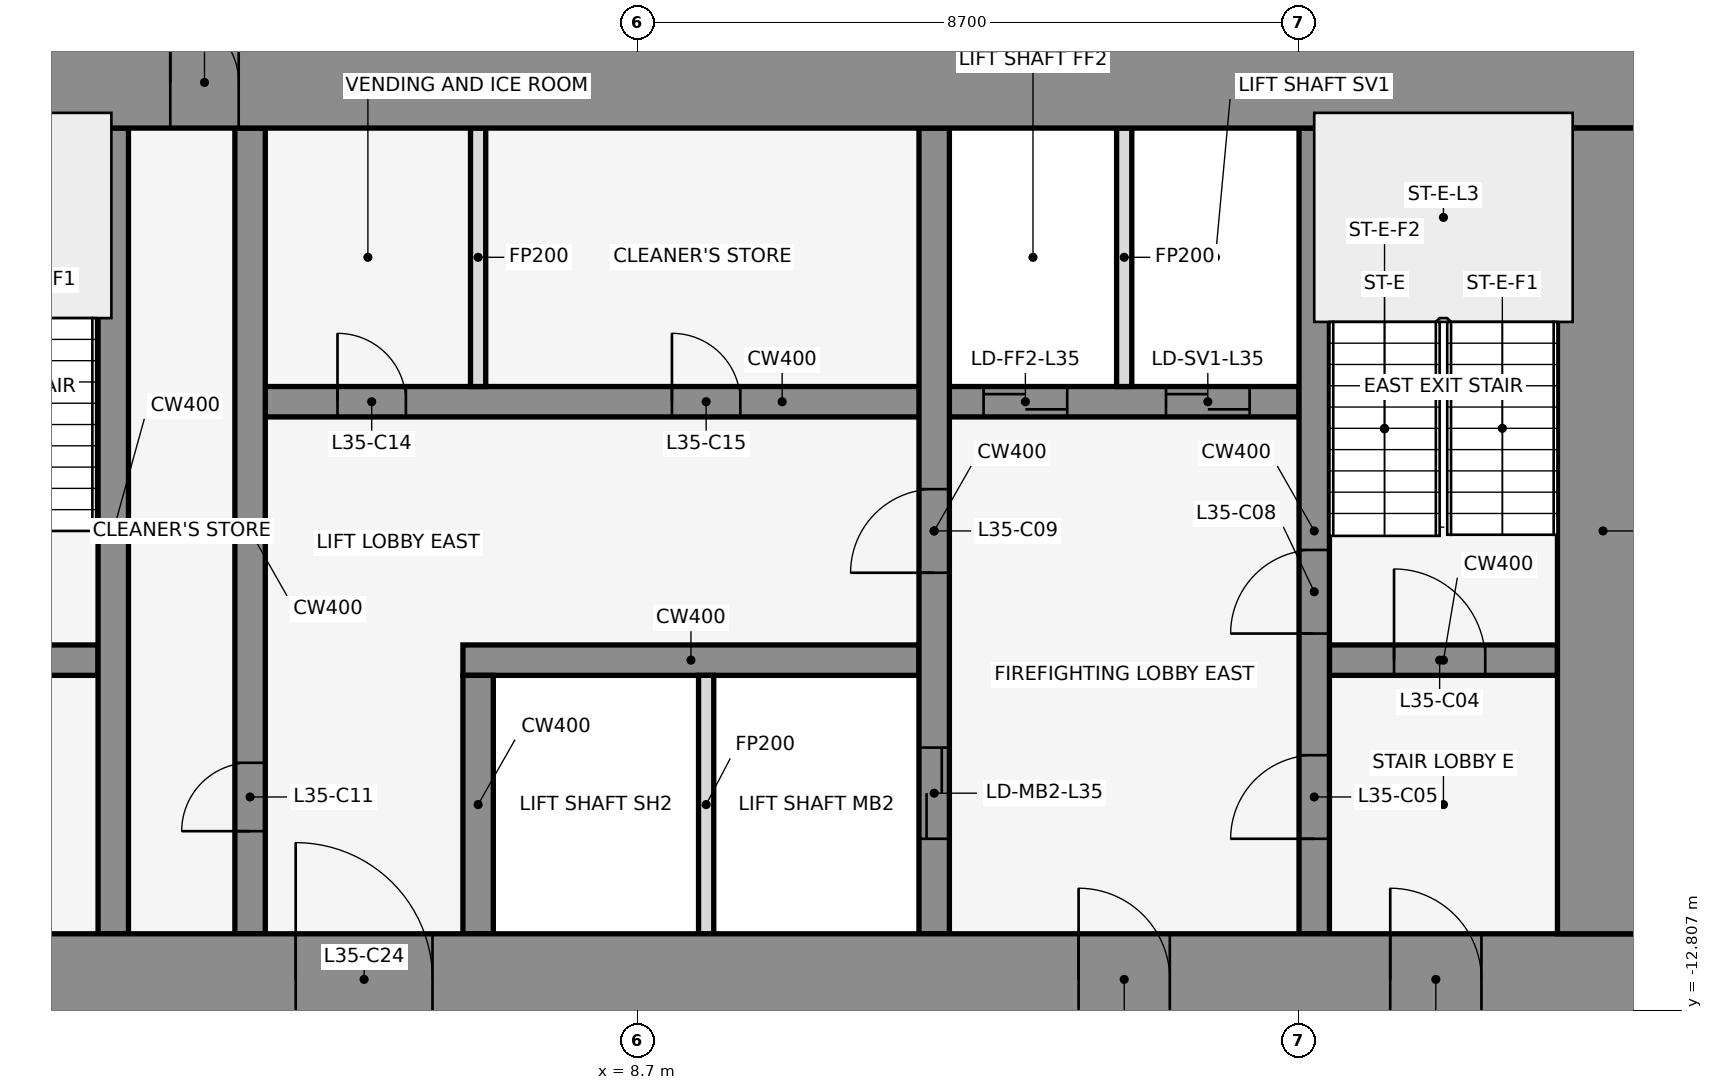
"""IFC4 building model, lengths in metres.
Left out: names, types, materials, properties, quantities, classifications, styles, units other than length and angle.
Written with IfcOpenShell. Run it as: python <this file> out.ifc"""

import sys

from ifc_helpers import new_model, si_unit, direction, frame, frame_2d, origin, place, context, subcontext, project, spatial, rectangle, extrude, element, fill, save


model = new_model("IFC4")
c1 = context("Model", 3, precision=1e-05, world=origin(), true_north=direction((0.0, 1.0)))
c2 = subcontext(c1, "Body", "Model", "MODEL_VIEW")
j1 = project(units=[si_unit("LENGTHUNIT", "METRE"), si_unit("PLANEANGLEUNIT", "RADIAN")], contexts=[c1])
p1 = place(None, origin())
s1 = spatial("IfcSite", under=j1, at=p1, CompositionType="ELEMENT")
p2 = place(p1, origin())
s2 = spatial("IfcBuilding", under=s1, at=p2, CompositionType="ELEMENT")
p3 = place(p2, frame((0.0, 0.0, 160.9)))
s3 = spatial("IfcBuildingStorey", under=s2, at=p3, CompositionType="ELEMENT", Elevation=160.9)
for number, where, z_axis, x_axis in (
    (1, (16.432, -0.105, 0.0), (0.0, 0.0, 1.0), (-0.84, 0.543, 0.0)),
    (2, (1.901, 1.08, 0.0), (0.0, 0.0, 1.0), (-0.84, -0.543, 0.0)),
):
    element("IfcWall", number, at=place(p3, frame(where, z_axis=z_axis, x_axis=x_axis)), inside=s3, PredefinedType="STANDARD", context=c2, shape_type="SweptSolid", body=[
        extrude(rectangle(XDim=2.183, YDim=0.25, at=frame_2d((1.091, 0.0))), origin(), (0.0, 0.0, 1.0), 3.95),
    ])
p4 = place(p3, frame((-1.6, -8.2, 0.0), z_axis=(0.0, 0.0, 1.0), x_axis=(1.0, 0.0, 0.0)))
e3 = element("IfcWall", 3, at=p4, inside=s3, PredefinedType="SHEAR", context=c2, shape_type="SweptSolid", body=[
    extrude(rectangle(XDim=3.2, YDim=0.4, at=frame_2d((1.6, 0.0))), origin(), (0.0, 0.0, 1.0), 4.1),
])
p5 = place(p4, frame((1.05, 0.0, 0.0)))
e4 = element("IfcOpeningElement", 4, at=p5, cuts=e3, PredefinedType="OPENING", context=c2, shape_type="SweptSolid", body=[
    extrude(rectangle(XDim=1.2, YDim=2.1, at=frame_2d((0.6, 1.05))), frame((0.0, 0.212, 0.0), z_axis=(0.0, -1.0, 0.0), x_axis=(1.0, 0.0, 0.0)), (0.0, 0.0, 1.0), 0.424),
])
p6 = place(p3, frame((6.4, -8.2, 0.0), z_axis=(0.0, 0.0, 1.0), x_axis=(1.0, 0.0, 0.0)))
e5 = element("IfcWall", 5, at=p6, inside=s3, PredefinedType="SHEAR", context=c2, shape_type="SweptSolid", body=[
    extrude(rectangle(XDim=6.0, YDim=0.4, at=frame_2d((3.0, 0.0))), origin(), (0.0, 0.0, 1.0), 4.1),
])
p7 = place(p3, frame((17.8, -8.2, 0.0), z_axis=(0.0, 0.0, 1.0), x_axis=(1.0, 0.0, 0.0)))
e6 = element("IfcWall", 6, at=p7, inside=s3, PredefinedType="SHEAR", context=c2, shape_type="SweptSolid", body=[
    extrude(rectangle(XDim=3.0, YDim=0.4, at=frame_2d((1.5, 0.0))), origin(), (0.0, 0.0, 1.0), 4.1),
])
p8 = place(p7, frame((0.85, 0.0, 0.0)))
e7 = element("IfcOpeningElement", 7, at=p8, cuts=e6, PredefinedType="OPENING", context=c2, shape_type="SweptSolid", body=[
    extrude(rectangle(XDim=1.2, YDim=2.1, at=frame_2d((0.6, 1.05))), frame((0.0, 0.212, 0.0), z_axis=(0.0, -1.0, 0.0), x_axis=(1.0, 0.0, 0.0)), (0.0, 0.0, 1.0), 0.424),
])
p9 = place(p3, frame((3.8, -4.8, 0.0), z_axis=(0.0, 0.0, 1.0), x_axis=(1.0, 0.0, 0.0)))
e8 = element("IfcWall", 8, at=p9, inside=s3, PredefinedType="SHEAR", context=c2, shape_type="SweptSolid", body=[
    extrude(rectangle(XDim=13.6, YDim=0.4, at=frame_2d((6.8, 0.0))), origin(), (0.0, 0.0, 1.0), 4.1),
])
p10 = place(p9, frame((9.45, 0.0, 0.0)))
e9 = element("IfcOpeningElement", 9, at=p10, cuts=e8, PredefinedType="OPENING", context=c2, shape_type="SweptSolid", body=[
    extrude(rectangle(XDim=1.1, YDim=2.1, at=frame_2d((0.55, 1.05))), frame((0.0, 0.212, 0.0), z_axis=(0.0, -1.0, 0.0), x_axis=(1.0, 0.0, 0.0)), (0.0, 0.0, 1.0), 0.424),
])
p11 = place(p9, frame((11.85, 0.0, 0.0)))
e10 = element("IfcOpeningElement", 10, at=p11, cuts=e8, PredefinedType="OPENING", context=c2, shape_type="SweptSolid", body=[
    extrude(rectangle(XDim=1.1, YDim=2.1, at=frame_2d((0.55, 1.05))), frame((0.0, 0.212, 0.0), z_axis=(0.0, -1.0, 0.0), x_axis=(1.0, 0.0, 0.0)), (0.0, 0.0, 1.0), 0.424),
])
p12 = place(p9, frame((0.95, 0.0, 0.0)))
e11 = element("IfcOpeningElement", 11, at=p12, cuts=e8, PredefinedType="OPENING", context=c2, shape_type="SweptSolid", body=[
    extrude(rectangle(XDim=0.9, YDim=2.1, at=frame_2d((0.45, 1.05))), frame((0.0, 0.212, 0.0), z_axis=(0.0, -1.0, 0.0), x_axis=(1.0, 0.0, 0.0)), (0.0, 0.0, 1.0), 0.424),
])
p13 = place(p9, frame((5.35, 0.0, 0.0)))
e12 = element("IfcOpeningElement", 12, at=p13, cuts=e8, PredefinedType="OPENING", context=c2, shape_type="SweptSolid", body=[
    extrude(rectangle(XDim=0.9, YDim=2.1, at=frame_2d((0.45, 1.05))), frame((0.0, 0.212, 0.0), z_axis=(0.0, -1.0, 0.0), x_axis=(1.0, 0.0, 0.0)), (0.0, 0.0, 1.0), 0.424),
])
p14 = place(p3, frame((1.8, -11.8, 0.0), z_axis=(0.0, 0.0, 1.0), x_axis=(0.0, 1.0, 0.0)))
e13 = element("IfcWall", 13, at=p14, inside=s3, PredefinedType="SHEAR", context=c2, shape_type="SweptSolid", body=[
    extrude(rectangle(XDim=10.6, YDim=0.4, at=frame_2d((5.3, 0.0))), origin(), (0.0, 0.0, 1.0), 4.1),
])
p15 = place(p3, frame((3.6, -11.8, 0.0), z_axis=(0.0, 0.0, 1.0), x_axis=(0.0, 1.0, 0.0)))
e14 = element("IfcWall", 14, at=p15, inside=s3, PredefinedType="SHEAR", context=c2, shape_type="SweptSolid", body=[
    extrude(rectangle(XDim=10.6, YDim=0.4, at=frame_2d((5.3, 0.0))), origin(), (0.0, 0.0, 1.0), 4.1),
])
p16 = place(p15, frame((1.35, 0.0, 0.0)))
e15 = element("IfcOpeningElement", 15, at=p16, cuts=e14, PredefinedType="OPENING", context=c2, shape_type="SweptSolid", body=[
    extrude(rectangle(XDim=0.9, YDim=2.1, at=frame_2d((0.45, 1.05))), frame((0.0, 0.212, 0.0), z_axis=(0.0, -1.0, 0.0), x_axis=(1.0, 0.0, 0.0)), (0.0, 0.0, 1.0), 0.424),
])
p17 = place(p3, frame((6.6, -11.8, 0.0), z_axis=(0.0, 0.0, 1.0), x_axis=(0.0, 1.0, 0.0)))
e16 = element("IfcWall", 16, at=p17, inside=s3, PredefinedType="SHEAR", context=c2, shape_type="SweptSolid", body=[
    extrude(rectangle(XDim=3.4, YDim=0.4, at=frame_2d((1.7, 0.0))), origin(), (0.0, 0.0, 1.0), 4.1),
])
for number, where, z_axis, x_axis in (
    (17, (6.6, -4.6, 0.0), (0.0, 0.0, 1.0), (0.0, 1.0, 0.0)),
    (18, (9.6, -11.8, 0.0), (0.0, 0.0, 1.0), (0.0, 1.0, 0.0)),
):
    element("IfcWall", number, at=place(p3, frame(where, z_axis=z_axis, x_axis=x_axis)), inside=s3, PredefinedType="PARTITIONING", context=c2, shape_type="SweptSolid", body=[
        extrude(rectangle(XDim=3.4, YDim=0.2, at=frame_2d((1.7, 0.0))), origin(), (0.0, 0.0, 1.0), 2.841),
    ])
p18 = place(p3, frame((12.6, -11.8, 0.0), z_axis=(0.0, 0.0, 1.0), x_axis=(0.0, 1.0, 0.0)))
e19 = element("IfcWall", 19, at=p18, inside=s3, PredefinedType="SHEAR", context=c2, shape_type="SweptSolid", body=[
    extrude(rectangle(XDim=10.6, YDim=0.4, at=frame_2d((5.3, 0.0))), origin(), (0.0, 0.0, 1.0), 4.1),
])
p19 = place(p18, frame((1.25, 0.0, 0.0)))
e20 = element("IfcOpeningElement", 20, at=p19, cuts=e19, PredefinedType="OPENING", context=c2, shape_type="SweptSolid", body=[
    extrude(rectangle(XDim=1.2, YDim=2.1, at=frame_2d((0.6, 1.05))), frame((0.0, 0.212, 0.0), z_axis=(0.0, -1.0, 0.0), x_axis=(1.0, 0.0, 0.0)), (0.0, 0.0, 1.0), 0.424),
])
p20 = place(p18, frame((4.75, 0.0, 0.0)))
e21 = element("IfcOpeningElement", 21, at=p20, cuts=e19, PredefinedType="OPENING", context=c2, shape_type="SweptSolid", body=[
    extrude(rectangle(XDim=1.1, YDim=2.1, at=frame_2d((0.55, 1.05))), frame((0.0, 0.212, 0.0), z_axis=(0.0, -1.0, 0.0), x_axis=(1.0, 0.0, 0.0)), (0.0, 0.0, 1.0), 0.424),
])
p21 = place(p3, frame((15.1, -4.6, 0.0), z_axis=(0.0, 0.0, 1.0), x_axis=(0.0, 1.0, 0.0)))
e22 = element("IfcWall", 22, at=p21, inside=s3, PredefinedType="PARTITIONING", context=c2, shape_type="SweptSolid", body=[
    extrude(rectangle(XDim=3.4, YDim=0.2, at=frame_2d((1.7, 0.0))), origin(), (0.0, 0.0, 1.0), 2.841),
])
p22 = place(p3, frame((17.6, -11.8, 0.0), z_axis=(0.0, 0.0, 1.0), x_axis=(0.0, 1.0, 0.0)))
e23 = element("IfcWall", 23, at=p22, inside=s3, PredefinedType="SHEAR", context=c2, shape_type="SweptSolid", body=[
    extrude(rectangle(XDim=10.6, YDim=0.4, at=frame_2d((5.3, 0.0))), origin(), (0.0, 0.0, 1.0), 4.1),
])
p23 = place(p22, frame((1.25, 0.0, 0.0)))
e24 = element("IfcOpeningElement", 24, at=p23, cuts=e23, PredefinedType="OPENING", context=c2, shape_type="SweptSolid", body=[
    extrude(rectangle(XDim=1.1, YDim=2.1, at=frame_2d((0.55, 1.05))), frame((0.0, 0.212, 0.0), z_axis=(0.0, -1.0, 0.0), x_axis=(1.0, 0.0, 0.0)), (0.0, 0.0, 1.0), 0.424),
])
p24 = place(p22, frame((3.95, 0.0, 0.0)))
e25 = element("IfcOpeningElement", 25, at=p24, cuts=e23, PredefinedType="OPENING", context=c2, shape_type="SweptSolid", body=[
    extrude(rectangle(XDim=1.1, YDim=2.1, at=frame_2d((0.55, 1.05))), frame((0.0, 0.212, 0.0), z_axis=(0.0, -1.0, 0.0), x_axis=(1.0, 0.0, 0.0)), (0.0, 0.0, 1.0), 0.424),
])
p25 = place(p3, frame((-22.0, -0.6, 0.0), z_axis=(0.0, 0.0, 1.0), x_axis=(1.0, 0.0, 0.0)))
e26 = element("IfcWall", 26, at=p25, inside=s3, PredefinedType="SHEAR", context=c2, shape_type="SweptSolid", body=[
    extrude(rectangle(XDim=44.0, YDim=1.2, at=frame_2d((22.0, 0.0))), origin(), (0.0, 0.0, 1.0), 4.1),
])
p26 = place(p25, frame((18.55, 0.0, 0.0)))
e27 = element("IfcOpeningElement", 27, at=p26, cuts=e26, PredefinedType="OPENING", context=c2, shape_type="SweptSolid", body=[
    extrude(rectangle(XDim=0.9, YDim=2.1, at=frame_2d((0.45, 1.05))), frame((0.0, 0.612, 0.0), z_axis=(0.0, -1.0, 0.0), x_axis=(1.0, 0.0, 0.0)), (0.0, 0.0, 1.0), 1.224),
])
p27 = place(p25, frame((24.55, 0.0, 0.0)))
e28 = element("IfcOpeningElement", 28, at=p27, cuts=e26, PredefinedType="OPENING", context=c2, shape_type="SweptSolid", body=[
    extrude(rectangle(XDim=0.9, YDim=2.1, at=frame_2d((0.45, 1.05))), frame((0.0, 0.612, 0.0), z_axis=(0.0, -1.0, 0.0), x_axis=(1.0, 0.0, 0.0)), (0.0, 0.0, 1.0), 1.224),
])
p28 = place(p3, frame((-22.0, -12.4, 0.0), z_axis=(0.0, 0.0, 1.0), x_axis=(1.0, 0.0, 0.0)))
e29 = element("IfcWall", 29, at=p28, inside=s3, PredefinedType="SHEAR", context=c2, shape_type="SweptSolid", body=[
    extrude(rectangle(XDim=44.0, YDim=1.2, at=frame_2d((22.0, 0.0))), origin(), (0.0, 0.0, 1.0), 4.1),
])
p29 = place(p28, frame((2.2, 0.0, 0.0)))
e30 = element("IfcOpeningElement", 30, at=p29, cuts=e29, PredefinedType="OPENING", context=c2, shape_type="SweptSolid", body=[
    extrude(rectangle(XDim=1.2, YDim=2.1, at=frame_2d((0.6, 1.05))), frame((0.0, 0.612, 0.0), z_axis=(0.0, -1.0, 0.0), x_axis=(1.0, 0.0, 0.0)), (0.0, 0.0, 1.0), 1.224),
])
p30 = place(p28, frame((21.4, 0.0, 0.0)))
e31 = element("IfcOpeningElement", 31, at=p30, cuts=e29, PredefinedType="OPENING", context=c2, shape_type="SweptSolid", body=[
    extrude(rectangle(XDim=1.2, YDim=2.1, at=frame_2d((0.6, 1.05))), frame((0.0, 0.612, 0.0), z_axis=(0.0, -1.0, 0.0), x_axis=(1.0, 0.0, 0.0)), (0.0, 0.0, 1.0), 1.224),
])
p31 = place(p28, frame((40.6, 0.0, 0.0)))
e32 = element("IfcOpeningElement", 32, at=p31, cuts=e29, PredefinedType="OPENING", context=c2, shape_type="SweptSolid", body=[
    extrude(rectangle(XDim=1.2, YDim=2.1, at=frame_2d((0.6, 1.05))), frame((0.0, 0.612, 0.0), z_axis=(0.0, -1.0, 0.0), x_axis=(1.0, 0.0, 0.0)), (0.0, 0.0, 1.0), 1.224),
])
p32 = place(p28, frame((16.0, 0.0, 0.0)))
e33 = element("IfcOpeningElement", 33, at=p32, cuts=e29, PredefinedType="OPENING", context=c2, shape_type="SweptSolid", body=[
    extrude(rectangle(XDim=1.8, YDim=2.1, at=frame_2d((0.9, 1.05))), frame((0.0, 0.612, 0.0), z_axis=(0.0, -1.0, 0.0), x_axis=(1.0, 0.0, 0.0)), (0.0, 0.0, 1.0), 1.224),
])
p33 = place(p28, frame((6.3, 0.0, 0.0)))
e34 = element("IfcOpeningElement", 34, at=p33, cuts=e29, PredefinedType="OPENING", context=c2, shape_type="SweptSolid", body=[
    extrude(rectangle(XDim=1.2, YDim=2.1, at=frame_2d((0.6, 1.05))), frame((0.0, 0.612, 0.0), z_axis=(0.0, -1.0, 0.0), x_axis=(1.0, 0.0, 0.0)), (0.0, 0.0, 1.0), 1.224),
])
p34 = place(p28, frame((26.2, 0.0, 0.0)))
e35 = element("IfcOpeningElement", 35, at=p34, cuts=e29, PredefinedType="OPENING", context=c2, shape_type="SweptSolid", body=[
    extrude(rectangle(XDim=1.8, YDim=2.1, at=frame_2d((0.9, 1.05))), frame((0.0, 0.612, 0.0), z_axis=(0.0, -1.0, 0.0), x_axis=(1.0, 0.0, 0.0)), (0.0, 0.0, 1.0), 1.224),
])
p35 = place(p28, frame((36.5, 0.0, 0.0)))
e36 = element("IfcOpeningElement", 36, at=p35, cuts=e29, PredefinedType="OPENING", context=c2, shape_type="SweptSolid", body=[
    extrude(rectangle(XDim=1.2, YDim=2.1, at=frame_2d((0.6, 1.05))), frame((0.0, 0.612, 0.0), z_axis=(0.0, -1.0, 0.0), x_axis=(1.0, 0.0, 0.0)), (0.0, 0.0, 1.0), 1.224),
])
p36 = place(p3, frame((21.4, -11.8, 0.0), z_axis=(0.0, 0.0, 1.0), x_axis=(0.0, 1.0, 0.0)))
e37 = element("IfcWall", 37, at=p36, inside=s3, PredefinedType="SHEAR", context=c2, shape_type="SweptSolid", body=[
    extrude(rectangle(XDim=10.6, YDim=1.2, at=frame_2d((5.3, 0.0))), origin(), (0.0, 0.0, 1.0), 4.1),
])
p37 = place(p8, origin())
e38 = element("IfcDoor", 38, at=p37, inside=s3, OperationType="SINGLE_SWING_RIGHT", PredefinedType="DOOR", context=c2, shape_type="SweptSolid", body=[
    extrude(rectangle(XDim=1.2, YDim=2.1, at=frame_2d((0.6, 1.05))), frame((0.0, 0.025, 0.0), z_axis=(0.0, -1.0, 0.0), x_axis=(1.0, 0.0, 0.0)), (0.0, 0.0, 1.0), 0.05),
])
fill(e7, e38)
p38 = place(p23, origin())
e39 = element("IfcDoor", 39, at=p38, inside=s3, OperationType="SINGLE_SWING_LEFT", PredefinedType="DOOR", context=c2, shape_type="SweptSolid", body=[
    extrude(rectangle(XDim=1.1, YDim=2.1, at=frame_2d((0.55, 1.05))), frame((0.0, 0.025, 0.0), z_axis=(0.0, -1.0, 0.0), x_axis=(1.0, 0.0, 0.0)), (0.0, 0.0, 1.0), 0.05),
])
fill(e24, e39)
p39 = place(p19, origin())
e40 = element("IfcDoor", 40, at=p39, inside=s3, OperationType="DOUBLE_DOOR_SLIDING", PredefinedType="DOOR", context=c2, shape_type="SweptSolid", body=[
    extrude(rectangle(XDim=1.2, YDim=2.1, at=frame_2d((0.6, 1.05))), frame((0.0, 0.025, 0.0), z_axis=(0.0, -1.0, 0.0), x_axis=(1.0, 0.0, 0.0)), (0.0, 0.0, 1.0), 0.05),
])
fill(e20, e40)
p40 = place(p10, origin())
e41 = element("IfcDoor", 41, at=p40, inside=s3, OperationType="DOUBLE_DOOR_SLIDING", PredefinedType="DOOR", context=c2, shape_type="SweptSolid", body=[
    extrude(rectangle(XDim=1.1, YDim=2.1, at=frame_2d((0.55, 1.05))), frame((0.0, 0.025, 0.0), z_axis=(0.0, -1.0, 0.0), x_axis=(1.0, 0.0, 0.0)), (0.0, 0.0, 1.0), 0.05),
])
fill(e9, e41)
p41 = place(p11, origin())
e42 = element("IfcDoor", 42, at=p41, inside=s3, OperationType="DOUBLE_DOOR_SLIDING", PredefinedType="DOOR", context=c2, shape_type="SweptSolid", body=[
    extrude(rectangle(XDim=1.1, YDim=2.1, at=frame_2d((0.55, 1.05))), frame((0.0, 0.025, 0.0), z_axis=(0.0, -1.0, 0.0), x_axis=(1.0, 0.0, 0.0)), (0.0, 0.0, 1.0), 0.05),
])
fill(e10, e42)
p42 = place(p24, origin())
e43 = element("IfcDoor", 43, at=p42, inside=s3, OperationType="SINGLE_SWING_RIGHT", PredefinedType="DOOR", context=c2, shape_type="SweptSolid", body=[
    extrude(rectangle(XDim=1.1, YDim=2.1, at=frame_2d((0.55, 1.05))), frame((0.0, 0.025, 0.0), z_axis=(0.0, -1.0, 0.0), x_axis=(1.0, 0.0, 0.0)), (0.0, 0.0, 1.0), 0.05),
])
fill(e25, e43)
p43 = place(p20, frame((1.1, 0.0, 0.0), z_axis=(0.0, 0.0, 1.0), x_axis=(-1.0, 0.0, 0.0)))
e44 = element("IfcDoor", 44, at=p43, inside=s3, OperationType="SINGLE_SWING_RIGHT", PredefinedType="DOOR", context=c2, shape_type="SweptSolid", body=[
    extrude(rectangle(XDim=1.1, YDim=2.1, at=frame_2d((0.55, 1.05))), frame((0.0, 0.025, 0.0), z_axis=(0.0, -1.0, 0.0), x_axis=(1.0, 0.0, 0.0)), (0.0, 0.0, 1.0), 0.05),
])
fill(e21, e44)
p44 = place(p16, origin())
e45 = element("IfcDoor", 45, at=p44, inside=s3, OperationType="SINGLE_SWING_LEFT", PredefinedType="DOOR", context=c2, shape_type="SweptSolid", body=[
    extrude(rectangle(XDim=0.9, YDim=2.1, at=frame_2d((0.45, 1.05))), frame((0.0, 0.025, 0.0), z_axis=(0.0, -1.0, 0.0), x_axis=(1.0, 0.0, 0.0)), (0.0, 0.0, 1.0), 0.05),
])
fill(e15, e45)
p45 = place(p12, origin())
e46 = element("IfcDoor", 46, at=p45, inside=s3, OperationType="SINGLE_SWING_RIGHT", PredefinedType="DOOR", context=c2, shape_type="SweptSolid", body=[
    extrude(rectangle(XDim=0.9, YDim=2.1, at=frame_2d((0.45, 1.05))), frame((0.0, 0.025, 0.0), z_axis=(0.0, -1.0, 0.0), x_axis=(1.0, 0.0, 0.0)), (0.0, 0.0, 1.0), 0.05),
])
fill(e11, e46)
p46 = place(p13, origin())
e47 = element("IfcDoor", 47, at=p46, inside=s3, OperationType="SINGLE_SWING_LEFT", PredefinedType="DOOR", context=c2, shape_type="SweptSolid", body=[
    extrude(rectangle(XDim=0.9, YDim=2.1, at=frame_2d((0.45, 1.05))), frame((0.0, 0.025, 0.0), z_axis=(0.0, -1.0, 0.0), x_axis=(1.0, 0.0, 0.0)), (0.0, 0.0, 1.0), 0.05),
])
fill(e12, e47)
p47 = place(p27, origin())
e48 = element("IfcDoor", 48, at=p47, inside=s3, OperationType="SINGLE_SWING_LEFT", PredefinedType="DOOR", context=c2, shape_type="SweptSolid", body=[
    extrude(rectangle(XDim=0.9, YDim=2.1, at=frame_2d((0.45, 1.05))), frame((0.0, 0.025, 0.0), z_axis=(0.0, -1.0, 0.0), x_axis=(1.0, 0.0, 0.0)), (0.0, 0.0, 1.0), 0.05),
])
fill(e28, e48)
p48 = place(p31, frame((1.2, 0.0, 0.0), z_axis=(0.0, 0.0, 1.0), x_axis=(-1.0, 0.0, 0.0)))
e49 = element("IfcDoor", 49, at=p48, inside=s3, OperationType="SINGLE_SWING_RIGHT", PredefinedType="DOOR", context=c2, shape_type="SweptSolid", body=[
    extrude(rectangle(XDim=1.2, YDim=2.1, at=frame_2d((0.6, 1.05))), frame((0.0, 0.025, 0.0), z_axis=(0.0, -1.0, 0.0), x_axis=(1.0, 0.0, 0.0)), (0.0, 0.0, 1.0), 0.05),
])
fill(e32, e49)
p49 = place(p34, origin())
e50 = element("IfcDoor", 50, at=p49, inside=s3, OperationType="SINGLE_SWING_LEFT", PredefinedType="DOOR", context=c2, shape_type="SweptSolid", body=[
    extrude(rectangle(XDim=1.8, YDim=2.1, at=frame_2d((0.9, 1.05))), frame((0.0, 0.025, 0.0), z_axis=(0.0, -1.0, 0.0), x_axis=(1.0, 0.0, 0.0)), (0.0, 0.0, 1.0), 0.05),
])
fill(e35, e50)
p50 = place(p35, frame((1.2, 0.0, 0.0), z_axis=(0.0, 0.0, 1.0), x_axis=(-1.0, 0.0, 0.0)))
e51 = element("IfcDoor", 51, at=p50, inside=s3, OperationType="SINGLE_SWING_RIGHT", PredefinedType="DOOR", context=c2, shape_type="SweptSolid", body=[
    extrude(rectangle(XDim=1.2, YDim=2.1, at=frame_2d((0.6, 1.05))), frame((0.0, 0.025, 0.0), z_axis=(0.0, -1.0, 0.0), x_axis=(1.0, 0.0, 0.0)), (0.0, 0.0, 1.0), 0.05),
])
fill(e36, e51)
save(model, sys.argv[1])
